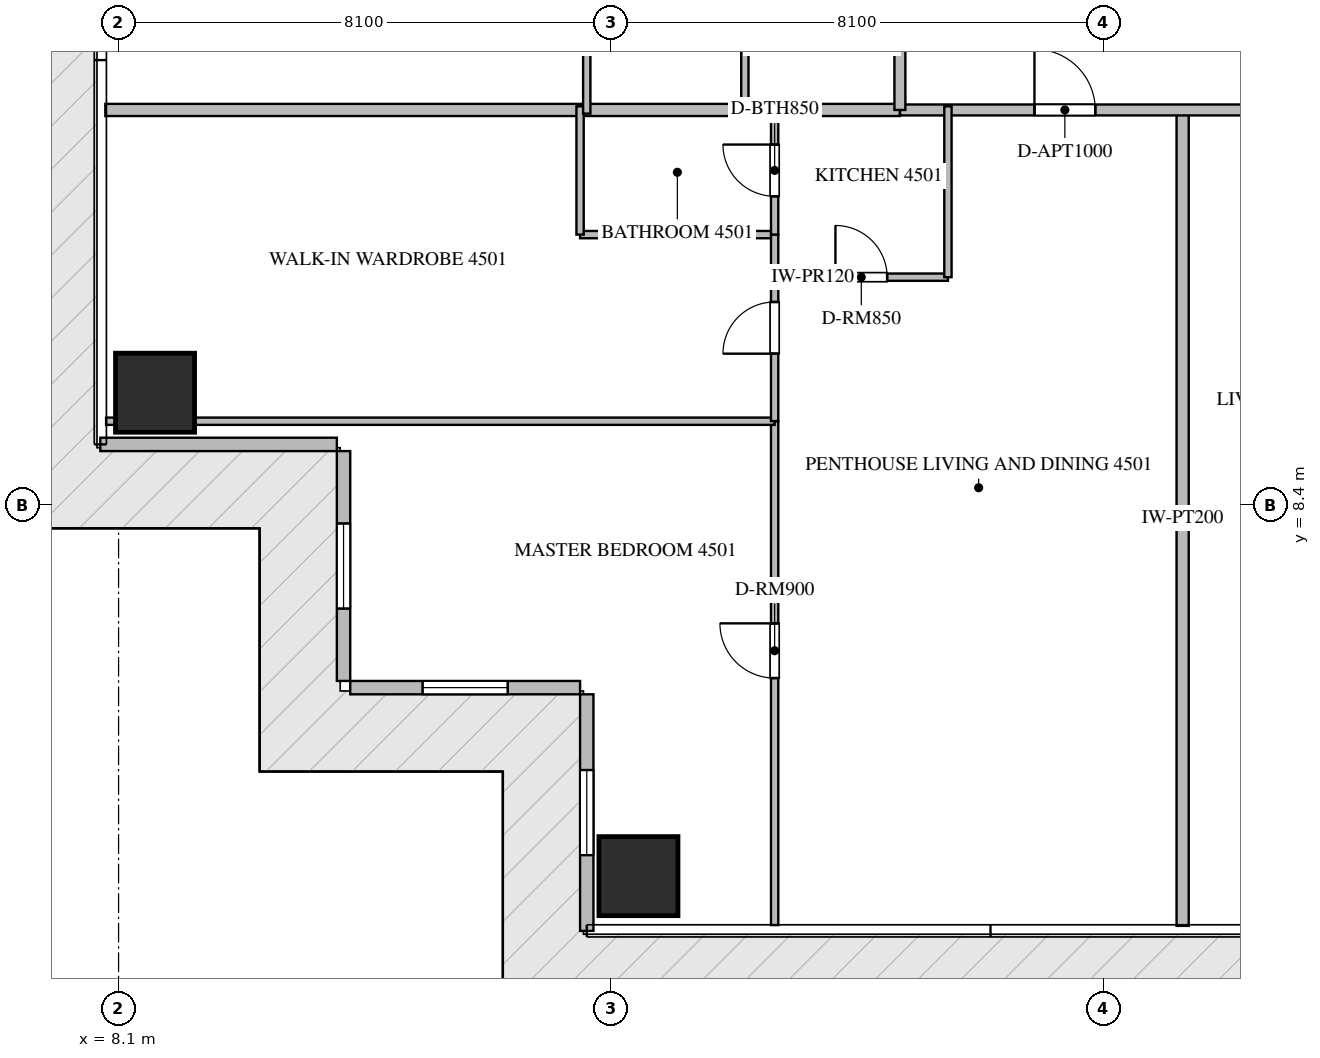
"""IFC4 building model, lengths in metres.
Left out: names, types, materials, properties, quantities, classifications, styles, units other than length and angle.
Written with IfcOpenShell. Run it as: python <this file> out.ifc"""

import sys

from ifc_helpers import new_model, si_unit, direction, frame, frame_2d, origin, origin_2d, place, context, subcontext, project, spatial, rectangle, extrude, source, transform, mapped, element, fill, save


model = new_model("IFC4")
c1 = context("Model", 3, precision=1e-05, world=origin(), true_north=direction((0.0, 1.0)))
c2 = subcontext(c1, "Body", "Model", "MODEL_VIEW")
j1 = project(units=[si_unit("LENGTHUNIT", "METRE"), si_unit("PLANEANGLEUNIT", "RADIAN")], contexts=[c1])
p1 = place(None, origin())
s1 = spatial("IfcSite", under=j1, at=p1, CompositionType="ELEMENT")
p2 = place(p1, origin())
s2 = spatial("IfcBuilding", under=s1, at=p2, CompositionType="ELEMENT")
p3 = place(p2, frame((0.0, 0.0, 180.15)))
s3 = spatial("IfcBuildingStorey", under=s2, at=p3, CompositionType="ELEMENT", Elevation=180.15)
m1 = source(origin(), c2, "Body", "SweptSolid", [
    extrude(rectangle(XDim=1.3, YDim=1.3, at=origin_2d()), origin(), (0.0, 0.0, 1.0), 3.75),
])
for number, where, z_axis, x_axis in (
    (1, (16.65, 2.3, -0.26), (0.0, 0.0, 1.0), (1.0, 0.0, 0.0)),
    (2, (8.7, 10.25, -0.26), (0.0, 0.0, 1.0), (1.0, 0.0, 0.0)),
):
    element("IfcColumn", number, at=place(p3, frame(where, z_axis=z_axis, x_axis=x_axis)), inside=s3, PredefinedType="COLUMN", context=c2, shape_type="MappedRepresentation", body=[
        mapped(m1, transform((0.0, 0.0, 0.0), scale=1.0)),
    ])
p4 = place(p3, frame((7.8, 9.4, 0.0), z_axis=(0.0, 0.0, 1.0), x_axis=(1.0, 0.0, 0.0)))
e3 = element("IfcWall", 3, at=p4, inside=s3, PredefinedType="ELEMENTEDWALL", context=c2, shape_type="SweptSolid", body=[
    extrude(rectangle(XDim=3.89, YDim=0.22, at=frame_2d((1.945, 0.0))), origin(), (0.0, 0.0, 1.0), 3.475),
])
p5 = place(p3, frame((11.8, 9.29, 0.0), z_axis=(0.0, 0.0, 1.0), x_axis=(0.0, -1.0, 0.0)))
e4 = element("IfcWall", 4, at=p5, inside=s3, PredefinedType="ELEMENTEDWALL", context=c2, shape_type="SweptSolid", body=[
    extrude(rectangle(XDim=3.78, YDim=0.22, at=frame_2d((1.89, 0.0))), origin(), (0.0, 0.0, 1.0), 3.475),
])
p6 = place(p5, frame((1.19, 0.0, 0.65)))
e5 = element("IfcOpeningElement", 5, at=p6, cuts=e4, PredefinedType="OPENING", context=c2, shape_type="SweptSolid", body=[
    extrude(rectangle(XDim=1.4, YDim=2.05, at=frame_2d((0.7, 1.025))), frame((0.0, 0.12, 0.0), z_axis=(0.0, -1.0, 0.0), x_axis=(1.0, 0.0, 0.0)), (0.0, 0.0, 1.0), 0.24),
])
p7 = place(p3, frame((11.91, 5.4, 0.0), z_axis=(0.0, 0.0, 1.0), x_axis=(1.0, 0.0, 0.0)))
e6 = element("IfcWall", 6, at=p7, inside=s3, PredefinedType="ELEMENTEDWALL", context=c2, shape_type="SweptSolid", body=[
    extrude(rectangle(XDim=3.78, YDim=0.22, at=frame_2d((1.89, 0.0))), origin(), (0.0, 0.0, 1.0), 3.475),
])
p8 = place(p7, frame((1.19, 0.0, 0.65)))
e7 = element("IfcOpeningElement", 7, at=p8, cuts=e6, PredefinedType="OPENING", context=c2, shape_type="SweptSolid", body=[
    extrude(rectangle(XDim=1.4, YDim=2.05, at=frame_2d((0.7, 1.025))), frame((0.0, 0.12, 0.0), z_axis=(0.0, -1.0, 0.0), x_axis=(1.0, 0.0, 0.0)), (0.0, 0.0, 1.0), 0.24),
])
p9 = place(p3, frame((15.8, 5.29, 0.0), z_axis=(0.0, 0.0, 1.0), x_axis=(0.0, -1.0, 0.0)))
e8 = element("IfcWall", 8, at=p9, inside=s3, PredefinedType="ELEMENTEDWALL", context=c2, shape_type="SweptSolid", body=[
    extrude(rectangle(XDim=3.89, YDim=0.22, at=frame_2d((1.945, 0.0))), origin(), (0.0, 0.0, 1.0), 3.475),
])
p10 = place(p9, frame((1.245, 0.0, 0.65)))
e9 = element("IfcOpeningElement", 9, at=p10, cuts=e8, PredefinedType="OPENING", context=c2, shape_type="SweptSolid", body=[
    extrude(rectangle(XDim=1.4, YDim=2.05, at=frame_2d((0.7, 1.025))), frame((0.0, 0.12, 0.0), z_axis=(0.0, -1.0, 0.0), x_axis=(1.0, 0.0, 0.0)), (0.0, 0.0, 1.0), 0.24),
])
p11 = place(p3, frame((25.6, 1.482, 0.0), z_axis=(0.0, 0.0, 1.0), x_axis=(0.0, 1.0, 0.0)))
e10 = element("IfcWall", 10, at=p11, inside=s3, PredefinedType="PARTITIONING", context=c2, shape_type="SweptSolid", body=[
    extrude(rectangle(XDim=13.418, YDim=0.2, at=frame_2d((6.709, 0.0))), origin(), (0.0, 0.0, 1.0), 3.49),
])
p12 = place(p3, frame((7.882, 14.9, 0.0), z_axis=(0.0, 0.0, 1.0), x_axis=(1.0, 0.0, 0.0)))
e11 = element("IfcWall", 11, at=p12, inside=s3, PredefinedType="PARTITIONING", context=c2, shape_type="SweptSolid", body=[
    extrude(rectangle(XDim=13.068, YDim=0.2, at=frame_2d((6.534, 0.0))), origin(), (0.0, 0.0, 1.0), 3.49),
])
p13 = place(p3, frame((20.952, 14.9, 0.0), z_axis=(0.0, 0.0, 1.0), x_axis=(1.0, 0.0, 0.0)))
e12 = element("IfcWall", 12, at=p13, inside=s3, PredefinedType="PARTITIONING", context=c2, shape_type="SweptSolid", body=[
    extrude(rectangle(XDim=22.896, YDim=0.18, at=frame_2d((11.448, 0.0))), origin(), (0.0, 0.0, 1.0), 3.49),
])
p14 = place(p13, frame((2.211, 0.0, 0.0)))
e13 = element("IfcOpeningElement", 13, at=p14, cuts=e12, PredefinedType="OPENING", context=c2, shape_type="SweptSolid", body=[
    extrude(rectangle(XDim=1.0, YDim=2.15, at=frame_2d((0.5, 1.075))), frame((0.0, 0.1, 0.0), z_axis=(0.0, -1.0, 0.0), x_axis=(1.0, 0.0, 0.0)), (0.0, 0.0, 1.0), 0.2),
])
p15 = place(p13, frame((6.7, 0.0, 0.0)))
e14 = element("IfcOpeningElement", 14, at=p15, cuts=e12, PredefinedType="OPENING", context=c2, shape_type="SweptSolid", body=[
    extrude(rectangle(XDim=1.0, YDim=2.15, at=frame_2d((0.5, 1.075))), frame((0.0, 0.1, 0.0), z_axis=(0.0, -1.0, 0.0), x_axis=(1.0, 0.0, 0.0)), (0.0, 0.0, 1.0), 0.2),
])
p16 = place(p13, frame((19.509, 0.0, 0.0)))
e15 = element("IfcOpeningElement", 15, at=p16, cuts=e12, PredefinedType="OPENING", context=c2, shape_type="SweptSolid", body=[
    extrude(rectangle(XDim=1.0, YDim=2.15, at=frame_2d((0.5, 1.075))), frame((0.0, 0.1, 0.0), z_axis=(0.0, -1.0, 0.0), x_axis=(1.0, 0.0, 0.0)), (0.0, 0.0, 1.0), 0.2),
])
p17 = place(p3, frame((20.95, 14.9, 0.0), z_axis=(0.0, 0.0, 1.0), x_axis=(0.0, 1.0, 0.0)))
e16 = element("IfcWall", 16, at=p17, inside=s3, PredefinedType="PARTITIONING", context=c2, shape_type="SweptSolid", body=[
    extrude(rectangle(XDim=18.7, YDim=0.18, at=frame_2d((9.35, 0.0))), origin(), (0.0, 0.0, 1.0), 3.49),
])
p18 = place(p17, frame((5.629, 0.0, 0.0)))
e17 = element("IfcOpeningElement", 17, at=p18, cuts=e16, PredefinedType="OPENING", context=c2, shape_type="SweptSolid", body=[
    extrude(rectangle(XDim=1.0, YDim=2.15, at=frame_2d((0.5, 1.075))), frame((0.0, 0.1, 0.0), z_axis=(0.0, -1.0, 0.0), x_axis=(1.0, 0.0, 0.0)), (0.0, 0.0, 1.0), 0.2),
])
p19 = place(p17, frame((10.709, 0.0, 0.0)))
e18 = element("IfcOpeningElement", 18, at=p19, cuts=e16, PredefinedType="OPENING", context=c2, shape_type="SweptSolid", body=[
    extrude(rectangle(XDim=1.0, YDim=2.15, at=frame_2d((0.5, 1.075))), frame((0.0, 0.1, 0.0), z_axis=(0.0, -1.0, 0.0), x_axis=(1.0, 0.0, 0.0)), (0.0, 0.0, 1.0), 0.2),
])
p20 = place(p3, frame((18.89, 12.15, 0.0), z_axis=(0.0, 0.0, 1.0), x_axis=(1.0, 0.0, 0.0)))
e19 = element("IfcWall", 19, at=p20, inside=s3, PredefinedType="PARTITIONING", context=c2, shape_type="SweptSolid", body=[
    extrude(rectangle(XDim=2.85, YDim=0.12, at=frame_2d((1.425, 0.0))), origin(), (0.0, 0.0, 1.0), 3.49),
])
p21 = place(p20, frame((1.0, 0.0, 0.0)))
e20 = element("IfcOpeningElement", 20, at=p21, cuts=e19, PredefinedType="OPENING", context=c2, shape_type="SweptSolid", body=[
    extrude(rectangle(XDim=0.85, YDim=2.1, at=frame_2d((0.425, 1.05))), frame((0.0, 0.07, 0.0), z_axis=(0.0, -1.0, 0.0), x_axis=(1.0, 0.0, 0.0)), (0.0, 0.0, 1.0), 0.14),
])
p22 = place(p3, frame((21.74, 12.15, 0.0), z_axis=(0.0, 0.0, 1.0), x_axis=(0.0, 1.0, 0.0)))
e21 = element("IfcWall", 21, at=p22, inside=s3, PredefinedType="PARTITIONING", context=c2, shape_type="SweptSolid", body=[
    extrude(rectangle(XDim=2.81, YDim=0.12, at=frame_2d((1.405, 0.0))), origin(), (0.0, 0.0, 1.0), 3.49),
])
p23 = place(p3, frame((18.89, 1.495, 0.0), z_axis=(0.0, 0.0, 1.0), x_axis=(0.0, 1.0, 0.0)))
e22 = element("IfcWall", 22, at=p23, inside=s3, PredefinedType="PARTITIONING", context=c2, shape_type="SweptSolid", body=[
    extrude(rectangle(XDim=8.286, YDim=0.12, at=frame_2d((4.143, 0.0))), origin(), (0.0, 0.0, 1.0), 3.49),
])
p24 = place(p23, frame((4.062, 0.0, 0.0)))
e23 = element("IfcOpeningElement", 23, at=p24, cuts=e22, PredefinedType="OPENING", context=c2, shape_type="SweptSolid", body=[
    extrude(rectangle(XDim=0.9, YDim=2.1, at=frame_2d((0.45, 1.05))), frame((0.0, 0.07, 0.0), z_axis=(0.0, -1.0, 0.0), x_axis=(1.0, 0.0, 0.0)), (0.0, 0.0, 1.0), 0.14),
])
p25 = place(p3, frame((7.895, 9.781, 0.0), z_axis=(0.0, 0.0, 1.0), x_axis=(1.0, 0.0, 0.0)))
e24 = element("IfcWall", 24, at=p25, inside=s3, PredefinedType="PARTITIONING", context=c2, shape_type="SweptSolid", body=[
    extrude(rectangle(XDim=10.995, YDim=0.12, at=frame_2d((5.498, 0.0))), origin(), (0.0, 0.0, 1.0), 3.49),
])
p26 = place(p3, frame((15.69, 12.85, 0.0), z_axis=(0.0, 0.0, 1.0), x_axis=(1.0, 0.0, 0.0)))
e25 = element("IfcWall", 25, at=p26, inside=s3, PredefinedType="PARTITIONING", context=c2, shape_type="SweptSolid", body=[
    extrude(rectangle(XDim=3.2, YDim=0.12, at=frame_2d((1.6, 0.0))), origin(), (0.0, 0.0, 1.0), 3.49),
])
p27 = place(p3, frame((15.69, 12.85, 0.0), z_axis=(0.0, 0.0, 1.0), x_axis=(0.0, 1.0, 0.0)))
e26 = element("IfcWall", 26, at=p27, inside=s3, PredefinedType="PARTITIONING", context=c2, shape_type="SweptSolid", body=[
    extrude(rectangle(XDim=2.11, YDim=0.12, at=frame_2d((1.055, 0.0))), origin(), (0.0, 0.0, 1.0), 3.49),
])
p28 = place(p3, frame((18.89, 9.783, 0.0), z_axis=(0.0, 0.0, 1.0), x_axis=(0.0, 1.0, 0.0)))
e27 = element("IfcWall", 27, at=p28, inside=s3, PredefinedType="PARTITIONING", context=c2, shape_type="SweptSolid", body=[
    extrude(rectangle(XDim=3.067, YDim=0.12, at=frame_2d((1.534, 0.0))), origin(), (0.0, 0.0, 1.0), 3.49),
])
p29 = place(p28, frame((1.109, 0.0, 0.0)))
e28 = element("IfcOpeningElement", 28, at=p29, cuts=e27, PredefinedType="OPENING", context=c2, shape_type="SweptSolid", body=[
    extrude(rectangle(XDim=0.85, YDim=2.1, at=frame_2d((0.425, 1.05))), frame((0.0, 0.07, 0.0), z_axis=(0.0, -1.0, 0.0), x_axis=(1.0, 0.0, 0.0)), (0.0, 0.0, 1.0), 0.14),
])
p30 = place(p3, frame((18.89, 12.852, 0.0), z_axis=(0.0, 0.0, 1.0), x_axis=(0.0, 1.0, 0.0)))
e29 = element("IfcWall", 29, at=p30, inside=s3, PredefinedType="PARTITIONING", context=c2, shape_type="SweptSolid", body=[
    extrude(rectangle(XDim=2.108, YDim=0.12, at=frame_2d((1.054, 0.0))), origin(), (0.0, 0.0, 1.0), 3.49),
])
p31 = place(p30, frame((0.629, 0.0, 0.0)))
e30 = element("IfcOpeningElement", 30, at=p31, cuts=e29, PredefinedType="OPENING", context=c2, shape_type="SweptSolid", body=[
    extrude(rectangle(XDim=0.85, YDim=2.1, at=frame_2d((0.425, 1.05))), frame((0.0, 0.07, 0.0), z_axis=(0.0, -1.0, 0.0), x_axis=(1.0, 0.0, 0.0)), (0.0, 0.0, 1.0), 0.14),
])
for number, where, z_axis, x_axis in (
    (31, (18.4, 14.84, 0.0), (0.0, 0.0, 1.0), (0.0, 1.0, 0.0)),
    (32, (15.8, 14.84, 0.0), (0.0, 0.0, 1.0), (0.0, 1.0, 0.0)),
):
    element("IfcWall", number, at=place(p3, frame(where, z_axis=z_axis, x_axis=x_axis)), inside=s3, PredefinedType="PARTITIONING", context=c2, shape_type="SweptSolid", body=[
        extrude(rectangle(XDim=2.81, YDim=0.12, at=frame_2d((1.405, 0.0))), origin(), (0.0, 0.0, 1.0), 3.49),
    ])
m2 = source(origin(), c2, "Body", "SweptSolid", [
    extrude(rectangle(XDim=1.4, YDim=2.05, at=frame_2d((0.7, 1.025))), frame((0.0, 0.03, 0.0), z_axis=(0.0, -1.0, 0.0), x_axis=(1.0, 0.0, 0.0)), (0.0, 0.0, 1.0), 0.06),
])
p32 = place(p6, origin())
e33 = element("IfcWindow", 33, at=p32, inside=s3, PartitioningType="SINGLE_PANEL", PredefinedType="WINDOW", context=c2, shape_type="MappedRepresentation", body=[
    mapped(m2, transform((0.0, 0.0, 0.0), scale=1.0)),
])
fill(e5, e33)
p33 = place(p8, origin())
e34 = element("IfcWindow", 34, at=p33, inside=s3, PartitioningType="SINGLE_PANEL", PredefinedType="WINDOW", context=c2, shape_type="MappedRepresentation", body=[
    mapped(m2, transform((0.0, 0.0, 0.0), scale=1.0)),
])
fill(e7, e34)
p34 = place(p10, origin())
e35 = element("IfcWindow", 35, at=p34, inside=s3, PartitioningType="SINGLE_PANEL", PredefinedType="WINDOW", context=c2, shape_type="MappedRepresentation", body=[
    mapped(m2, transform((0.0, 0.0, 0.0), scale=1.0)),
])
fill(e9, e35)
m3 = source(origin(), c2, "Body", "SweptSolid", [
    extrude(rectangle(XDim=1.0, YDim=2.15, at=frame_2d((0.5, 1.075))), frame((0.0, 0.025, 0.0), z_axis=(0.0, -1.0, 0.0), x_axis=(1.0, 0.0, 0.0)), (0.0, 0.0, 1.0), 0.05),
])
p35 = place(p14, origin())
e36 = element("IfcDoor", 36, at=p35, inside=s3, OperationType="SINGLE_SWING_LEFT", PredefinedType="DOOR", context=c2, shape_type="MappedRepresentation", body=[
    mapped(m3, transform((0.0, 0.0, 0.0), scale=1.0)),
])
fill(e13, e36)
m4 = source(origin(), c2, "Body", "SweptSolid", [
    extrude(rectangle(XDim=0.85, YDim=2.1, at=frame_2d((0.425, 1.05))), frame((0.0, 0.025, 0.0), z_axis=(0.0, -1.0, 0.0), x_axis=(1.0, 0.0, 0.0)), (0.0, 0.0, 1.0), 0.05),
])
p36 = place(p21, origin())
e37 = element("IfcDoor", 37, at=p36, inside=s3, OperationType="SINGLE_SWING_LEFT", PredefinedType="DOOR", context=c2, shape_type="MappedRepresentation", body=[
    mapped(m4, transform((0.0, 0.0, 0.0), scale=1.0)),
])
fill(e20, e37)
m5 = source(origin(), c2, "Body", "SweptSolid", [
    extrude(rectangle(XDim=0.9, YDim=2.1, at=frame_2d((0.45, 1.05))), frame((0.0, 0.025, 0.0), z_axis=(0.0, -1.0, 0.0), x_axis=(1.0, 0.0, 0.0)), (0.0, 0.0, 1.0), 0.05),
])
p37 = place(p24, origin())
e38 = element("IfcDoor", 38, at=p37, inside=s3, OperationType="SINGLE_SWING_RIGHT", PredefinedType="DOOR", context=c2, shape_type="MappedRepresentation", body=[
    mapped(m5, transform((0.0, 0.0, 0.0), scale=1.0)),
])
fill(e23, e38)
p38 = place(p29, origin())
e39 = element("IfcDoor", 39, at=p38, inside=s3, OperationType="SINGLE_SWING_LEFT", PredefinedType="DOOR", context=c2, shape_type="MappedRepresentation", body=[
    mapped(m4, transform((0.0, 0.0, 0.0), scale=1.0)),
])
fill(e28, e39)
p39 = place(p31, origin())
e40 = element("IfcDoor", 40, at=p39, inside=s3, OperationType="SINGLE_SWING_RIGHT", PredefinedType="DOOR", context=c2, shape_type="MappedRepresentation", body=[
    mapped(m4, transform((0.0, 0.0, 0.0), scale=1.0)),
])
fill(e30, e40)
save(model, sys.argv[1])
